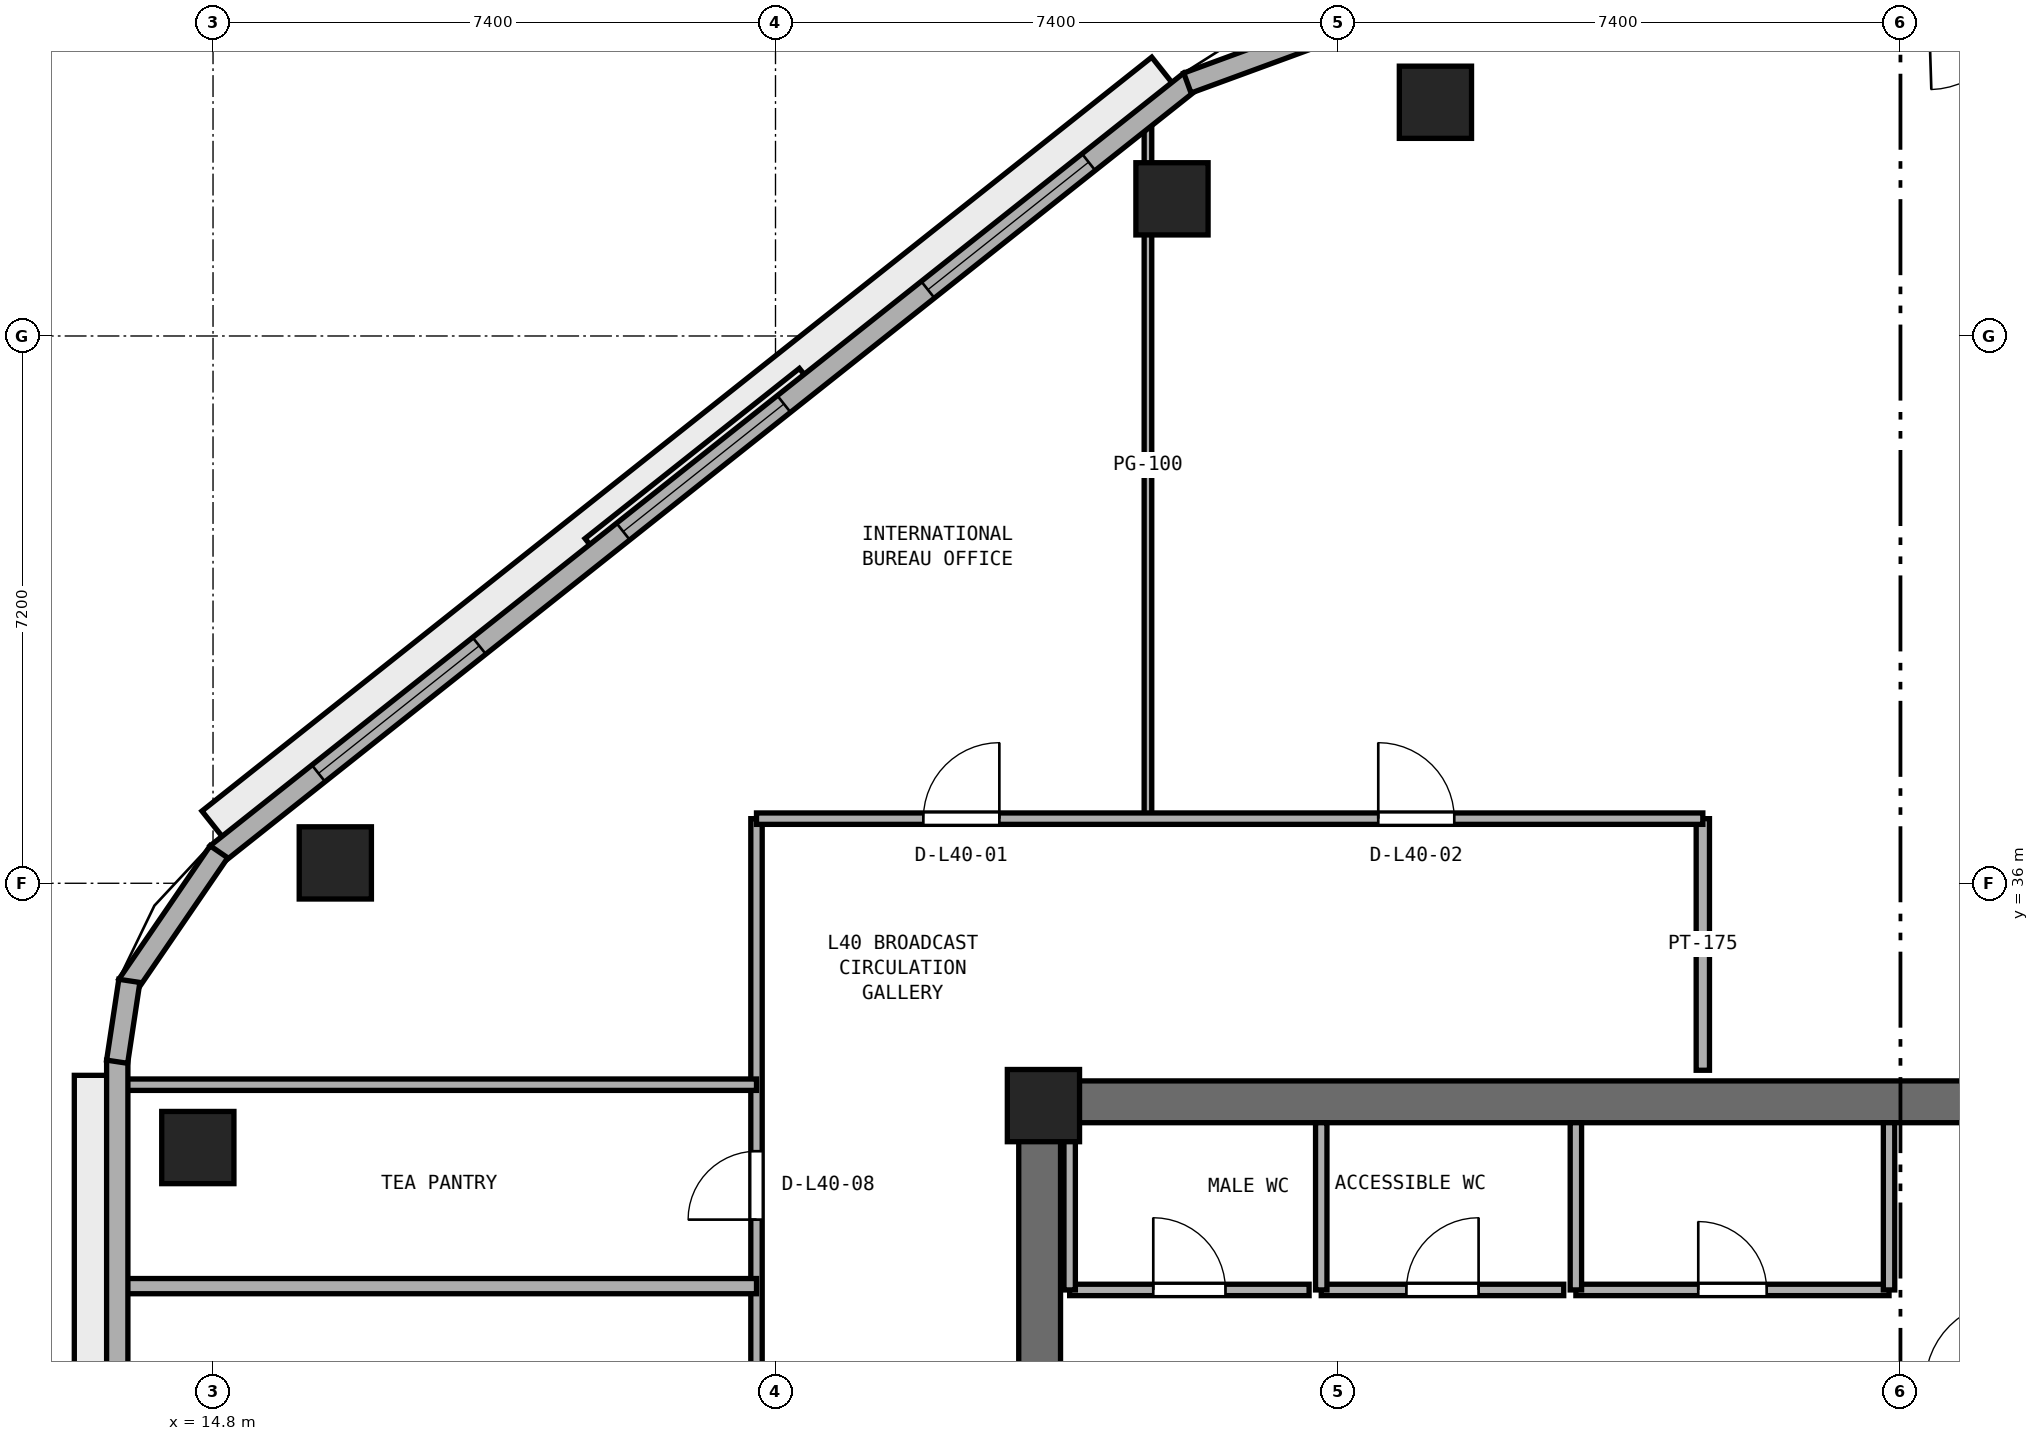
"""IFC4 building model, lengths in metres.
Left out: names, types, materials, properties, quantities, classifications, styles, units other than length and angle.
Written with IfcOpenShell. Run it as: python <this file> out.ifc"""

import sys

from ifc_helpers import new_model, si_unit, direction, frame, frame_2d, origin, origin_2d, place, context, subcontext, project, spatial, rectangle, extrude, element, fill, save


model = new_model("IFC4")
c1 = context("Model", 3, precision=1e-05, world=origin(), true_north=direction((0.0, 1.0)))
c2 = subcontext(c1, "Body", "Model", "MODEL_VIEW")
j1 = project(units=[si_unit("LENGTHUNIT", "METRE"), si_unit("PLANEANGLEUNIT", "RADIAN")], contexts=[c1])
p1 = place(None, origin())
s1 = spatial("IfcSite", under=j1, at=p1, CompositionType="ELEMENT")
p2 = place(p1, origin())
s2 = spatial("IfcBuilding", under=s1, at=p2, CompositionType="ELEMENT")
p3 = place(p2, frame((0.0, 0.0, 159.2)))
s3 = spatial("IfcBuildingStorey", under=s2, at=p3, CompositionType="ELEMENT", Elevation=159.2)
p4 = place(p3, frame((25.4, 33.125, 0.0), z_axis=(0.0, 0.0, 1.0), x_axis=(1.0, 0.0, 0.0)))
e1 = element("IfcWall", 1, at=p4, inside=s3, PredefinedType="SHEAR", context=c2, shape_type="SweptSolid", body=[
    extrude(rectangle(XDim=23.2, YDim=0.55, at=frame_2d((11.6, 0.0))), origin(), (0.0, 0.0, 1.0), 3.54),
])
p5 = place(p3, frame((25.675, 17.55, 0.0), z_axis=(0.0, 0.0, 1.0), x_axis=(0.0, 1.0, 0.0)))
e2 = element("IfcWall", 2, at=p5, inside=s3, PredefinedType="SHEAR", context=c2, shape_type="SweptSolid", body=[
    extrude(rectangle(XDim=15.3, YDim=0.55, at=frame_2d((7.65, 0.0))), origin(), (0.0, 0.0, 1.0), 3.54),
])
p6 = place(p5, frame((6.9, 0.0, 0.0)))
e3 = element("IfcOpeningElement", 3, at=p6, cuts=e2, PredefinedType="OPENING", context=c2, shape_type="SweptSolid", body=[
    extrude(rectangle(XDim=1.5, YDim=2.15, at=frame_2d((0.75, 1.075))), frame((0.0, 0.285, 0.0), z_axis=(0.0, -1.0, 0.0), x_axis=(1.0, 0.0, 0.0)), (0.0, 0.0, 1.0), 0.57),
])
p7 = place(p3, frame((25.725, 33.075, 0.0), z_axis=(0.0, 0.0, 1.0), x_axis=(1.0, 0.0, 0.0)))
e4 = element("IfcColumn", 4, at=p7, inside=s3, PredefinedType="PILASTER", context=c2, shape_type="SweptSolid", body=[
    extrude(rectangle(XDim=0.95, YDim=0.95, at=origin_2d()), origin(), (0.0, 0.0, 1.0), 3.8),
])
for number, where, z_axis, x_axis in (
    (5, (30.882, 46.275, 0.0), (0.0, 0.0, 1.0), (1.0, 0.0, 0.0)),
    (6, (27.416, 45.004, 0.0), (0.0, 0.0, 1.0), (1.0, 0.0, 0.0)),
    (7, (16.409, 36.268, 0.0), (0.0, 0.0, 1.0), (1.0, 0.0, 0.0)),
    (8, (14.6, 32.523, 0.0), (0.0, 0.0, 1.0), (1.0, 0.0, 0.0)),
):
    element("IfcColumn", number, at=place(p3, frame(where, z_axis=z_axis, x_axis=x_axis)), inside=s3, PredefinedType="COLUMN", context=c2, shape_type="SweptSolid", body=[
        extrude(rectangle(XDim=0.95, YDim=0.95, at=origin_2d()), origin(), (0.0, 0.0, 1.0), 3.8),
    ])
p8 = place(p3, frame((26.07, 30.65, 0.0), z_axis=(0.0, 0.0, 1.0), x_axis=(1.0, 0.0, 0.0)))
e9 = element("IfcWall", 9, at=p8, inside=s3, PredefinedType="PARTITIONING", context=c2, shape_type="SweptSolid", body=[
    extrude(rectangle(XDim=3.15, YDim=0.15, at=frame_2d((1.575, 0.0))), origin(), (0.0, 0.0, 1.0), 3.54),
])
p9 = place(p8, frame((1.1, 0.0, 0.0)))
e10 = element("IfcOpeningElement", 10, at=p9, cuts=e9, PredefinedType="OPENING", context=c2, shape_type="SweptSolid", body=[
    extrude(rectangle(XDim=0.95, YDim=2.1, at=frame_2d((0.475, 1.05))), frame((0.0, 0.085, 0.0), z_axis=(0.0, -1.0, 0.0), x_axis=(1.0, 0.0, 0.0)), (0.0, 0.0, 1.0), 0.17),
])
p10 = place(p3, frame((26.07, 30.65, 0.0), z_axis=(0.0, 0.0, 1.0), x_axis=(0.0, 1.0, 0.0)))
e11 = element("IfcWall", 11, at=p10, inside=s3, PredefinedType="PARTITIONING", context=c2, shape_type="SweptSolid", body=[
    extrude(rectangle(XDim=2.2, YDim=0.15, at=frame_2d((1.1, 0.0))), origin(), (0.0, 0.0, 1.0), 2.64),
])
p11 = place(p3, frame((29.38, 30.65, 0.0), z_axis=(0.0, 0.0, 1.0), x_axis=(1.0, 0.0, 0.0)))
e12 = element("IfcWall", 12, at=p11, inside=s3, PredefinedType="PARTITIONING", context=c2, shape_type="SweptSolid", body=[
    extrude(rectangle(XDim=3.19, YDim=0.15, at=frame_2d((1.595, 0.0))), origin(), (0.0, 0.0, 1.0), 3.54),
])
p12 = place(p11, frame((1.12, 0.0, 0.0)))
e13 = element("IfcOpeningElement", 13, at=p12, cuts=e12, PredefinedType="OPENING", context=c2, shape_type="SweptSolid", body=[
    extrude(rectangle(XDim=0.95, YDim=2.1, at=frame_2d((0.475, 1.05))), frame((0.0, 0.085, 0.0), z_axis=(0.0, -1.0, 0.0), x_axis=(1.0, 0.0, 0.0)), (0.0, 0.0, 1.0), 0.17),
])
p13 = place(p3, frame((29.38, 30.65, 0.0), z_axis=(0.0, 0.0, 1.0), x_axis=(0.0, 1.0, 0.0)))
e14 = element("IfcWall", 14, at=p13, inside=s3, PredefinedType="PARTITIONING", context=c2, shape_type="SweptSolid", body=[
    extrude(rectangle(XDim=2.2, YDim=0.15, at=frame_2d((1.1, 0.0))), origin(), (0.0, 0.0, 1.0), 3.54),
])
p14 = place(p3, frame((32.73, 30.65, 0.0), z_axis=(0.0, 0.0, 1.0), x_axis=(1.0, 0.0, 0.0)))
e15 = element("IfcWall", 15, at=p14, inside=s3, PredefinedType="PARTITIONING", context=c2, shape_type="SweptSolid", body=[
    extrude(rectangle(XDim=4.12, YDim=0.15, at=frame_2d((2.06, 0.0))), origin(), (0.0, 0.0, 1.0), 3.54),
])
p15 = place(p14, frame((1.61, 0.0, 0.0)))
e16 = element("IfcOpeningElement", 16, at=p15, cuts=e15, PredefinedType="OPENING", context=c2, shape_type="SweptSolid", body=[
    extrude(rectangle(XDim=0.9, YDim=2.1, at=frame_2d((0.45, 1.05))), frame((0.0, 0.085, 0.0), z_axis=(0.0, -1.0, 0.0), x_axis=(1.0, 0.0, 0.0)), (0.0, 0.0, 1.0), 0.17),
])
for number, where, z_axis, x_axis in (
    (17, (32.73, 30.65, 0.0), (0.0, 0.0, 1.0), (0.0, 1.0, 0.0)),
    (18, (36.85, 30.65, 0.0), (0.0, 0.0, 1.0), (0.0, 1.0, 0.0)),
):
    element("IfcWall", number, at=place(p3, frame(where, z_axis=z_axis, x_axis=x_axis)), inside=s3, PredefinedType="PARTITIONING", context=c2, shape_type="SweptSolid", body=[
        extrude(rectangle(XDim=2.2, YDim=0.15, at=frame_2d((1.1, 0.0))), origin(), (0.0, 0.0, 1.0), 3.54),
    ])
p16 = place(p3, frame((34.4, 33.54, 0.0), z_axis=(0.0, 0.0, 1.0), x_axis=(0.0, 1.0, 0.0)))
e19 = element("IfcWall", 19, at=p16, inside=s3, PredefinedType="PARTITIONING", context=c2, shape_type="SweptSolid", body=[
    extrude(rectangle(XDim=3.31, YDim=0.175, at=frame_2d((1.655, 0.0))), origin(), (0.0, 0.0, 1.0), 3.54),
])
p17 = place(p3, frame((27.1, 36.85, 0.0), z_axis=(0.0, 0.0, 1.0), x_axis=(0.0, 1.0, 0.0)))
e20 = element("IfcWall", 20, at=p17, inside=s3, PredefinedType="PARTITIONING", context=c2, shape_type="SweptSolid", body=[
    extrude(rectangle(XDim=9.295, YDim=0.1, at=frame_2d((4.648, 0.0))), origin(), (0.0, 0.0, 1.0), 3.54),
])
p18 = place(p3, frame((21.95, 26.55, 0.0), z_axis=(0.0, 0.0, 1.0), x_axis=(0.0, 1.0, 0.0)))
e21 = element("IfcWall", 21, at=p18, inside=s3, PredefinedType="PARTITIONING", context=c2, shape_type="SweptSolid", body=[
    extrude(rectangle(XDim=10.3, YDim=0.15, at=frame_2d((5.15, 0.0))), origin(), (0.0, 0.0, 1.0), 3.54),
])
p19 = place(p18, frame((5.025, 0.0, 0.0)))
e22 = element("IfcOpeningElement", 22, at=p19, cuts=e21, PredefinedType="OPENING", context=c2, shape_type="SweptSolid", body=[
    extrude(rectangle(XDim=0.9, YDim=2.1, at=frame_2d((0.45, 1.05))), frame((0.0, 0.085, 0.0), z_axis=(0.0, -1.0, 0.0), x_axis=(1.0, 0.0, 0.0)), (0.0, 0.0, 1.0), 0.17),
])
p20 = place(p3, frame((13.605, 30.7, 0.0), z_axis=(0.0, 0.0, 1.0), x_axis=(1.0, 0.0, 0.0)))
e23 = element("IfcWall", 23, at=p20, inside=s3, PredefinedType="PARTITIONING", context=c2, shape_type="SweptSolid", body=[
    extrude(rectangle(XDim=8.345, YDim=0.2, at=frame_2d((4.172, 0.0))), origin(), (0.0, 0.0, 1.0), 3.54),
])
p21 = place(p3, frame((13.605, 33.35, 0.0), z_axis=(0.0, 0.0, 1.0), x_axis=(1.0, 0.0, 0.0)))
e24 = element("IfcWall", 24, at=p21, inside=s3, PredefinedType="PARTITIONING", context=c2, shape_type="SweptSolid", body=[
    extrude(rectangle(XDim=8.345, YDim=0.15, at=frame_2d((4.172, 0.0))), origin(), (0.0, 0.0, 1.0), 3.54),
])
p22 = place(p3, frame((21.95, 36.85, 0.0), z_axis=(0.0, 0.0, 1.0), x_axis=(1.0, 0.0, 0.0)))
e25 = element("IfcWall", 25, at=p22, inside=s3, PredefinedType="PARTITIONING", context=c2, shape_type="SweptSolid", body=[
    extrude(rectangle(XDim=12.45, YDim=0.15, at=frame_2d((6.225, 0.0))), origin(), (0.0, 0.0, 1.0), 3.54),
])
p23 = place(p22, frame((2.195, 0.0, 0.0)))
e26 = element("IfcOpeningElement", 26, at=p23, cuts=e25, PredefinedType="OPENING", context=c2, shape_type="SweptSolid", body=[
    extrude(rectangle(XDim=1.0, YDim=2.12, at=frame_2d((0.5, 1.06))), frame((0.0, 0.085, 0.0), z_axis=(0.0, -1.0, 0.0), x_axis=(1.0, 0.0, 0.0)), (0.0, 0.0, 1.0), 0.17),
])
p24 = place(p22, frame((8.18, 0.0, 0.0)))
e27 = element("IfcOpeningElement", 27, at=p24, cuts=e25, PredefinedType="OPENING", context=c2, shape_type="SweptSolid", body=[
    extrude(rectangle(XDim=1.0, YDim=2.12, at=frame_2d((0.5, 1.06))), frame((0.0, 0.085, 0.0), z_axis=(0.0, -1.0, 0.0), x_axis=(1.0, 0.0, 0.0)), (0.0, 0.0, 1.0), 0.17),
])
p25 = place(p3, frame((27.658, 46.55, 0.0), z_axis=(0.0, 0.0, 1.0), x_axis=(-0.783266285861, -0.621686356158, 0.0)))
e28 = element("IfcWall", 28, at=p25, inside=s3, PredefinedType="STANDARD", context=c2, shape_type="SweptSolid", body=[
    extrude(rectangle(XDim=16.353, YDim=0.28, at=frame_2d((8.177, 0.0))), origin(), (0.0, 0.0, 1.0), 3.54),
])
p26 = place(p25, frame((1.709, 0.0, 0.9)))
e29 = element("IfcOpeningElement", 29, at=p26, cuts=e28, PredefinedType="OPENING", context=c2, shape_type="SweptSolid", body=[
    extrude(rectangle(XDim=2.7, YDim=1.75, at=frame_2d((1.35, 0.875))), frame((0.0, 0.15, 0.0), z_axis=(0.0, -1.0, 0.0), x_axis=(1.0, 0.0, 0.0)), (0.0, 0.0, 1.0), 0.3),
])
p27 = place(p25, frame((6.826, 0.0, 0.9)))
e30 = element("IfcOpeningElement", 30, at=p27, cuts=e28, PredefinedType="OPENING", context=c2, shape_type="SweptSolid", body=[
    extrude(rectangle(XDim=2.7, YDim=1.75, at=frame_2d((1.35, 0.875))), frame((0.0, 0.15, 0.0), z_axis=(0.0, -1.0, 0.0), x_axis=(1.0, 0.0, 0.0)), (0.0, 0.0, 1.0), 0.3),
])
p28 = place(p25, frame((11.944, 0.0, 0.9)))
e31 = element("IfcOpeningElement", 31, at=p28, cuts=e28, PredefinedType="OPENING", context=c2, shape_type="SweptSolid", body=[
    extrude(rectangle(XDim=2.7, YDim=1.75, at=frame_2d((1.35, 0.875))), frame((0.0, 0.15, 0.0), z_axis=(0.0, -1.0, 0.0), x_axis=(1.0, 0.0, 0.0)), (0.0, 0.0, 1.0), 0.3),
])
p29 = place(p3, frame((13.54, 33.673, 0.0), z_axis=(0.0, 0.0, 1.0), x_axis=(0.0, -1.0, 0.0)))
e32 = element("IfcWall", 32, at=p29, inside=s3, PredefinedType="STANDARD", context=c2, shape_type="SweptSolid", body=[
    extrude(rectangle(XDim=17.751, YDim=0.28, at=frame_2d((8.875, 0.0))), origin(), (0.0, 0.0, 1.0), 3.54),
])
p30 = place(p29, frame((13.109, 0.0, 0.9)))
e33 = element("IfcOpeningElement", 33, at=p30, cuts=e32, PredefinedType="OPENING", context=c2, shape_type="SweptSolid", body=[
    extrude(rectangle(XDim=2.7, YDim=1.75, at=frame_2d((1.35, 0.875))), frame((0.0, 0.15, 0.0), z_axis=(0.0, -1.0, 0.0), x_axis=(1.0, 0.0, 0.0)), (0.0, 0.0, 1.0), 0.3),
])
p31 = place(p3, frame((29.743, 47.306, 0.0), z_axis=(0.0, 0.0, 1.0), x_axis=(-0.93893328381, -0.344099242302, 0.0)))
e34 = element("IfcWall", 34, at=p31, inside=s3, PredefinedType="STANDARD", context=c2, shape_type="SweptSolid", body=[
    extrude(rectangle(XDim=2.262, YDim=0.28, at=frame_2d((1.131, 0.0))), origin(), (0.0, 0.0, 1.0), 3.54),
])
p32 = place(p3, frame((14.878, 36.414, 0.0), z_axis=(0.0, 0.0, 1.0), x_axis=(-0.564564614133, -0.825388875906, 0.0)))
e35 = element("IfcWall", 35, at=p32, inside=s3, PredefinedType="STANDARD", context=c2, shape_type="SweptSolid", body=[
    extrude(rectangle(XDim=2.128, YDim=0.28, at=frame_2d((1.064, 0.0))), origin(), (0.0, 0.0, 1.0), 3.54),
])
p33 = place(p3, frame((13.699, 34.716, 0.0), z_axis=(0.0, 0.0, 1.0), x_axis=(-0.149549920187, -0.988754176412, 0.0)))
e36 = element("IfcWall", 36, at=p33, inside=s3, PredefinedType="STANDARD", context=c2, shape_type="SweptSolid", body=[
    extrude(rectangle(XDim=1.076, YDim=0.28, at=frame_2d((0.538, 0.0))), origin(), (0.0, 0.0, 1.0), 3.54),
])
p34 = place(p9, origin())
e37 = element("IfcDoor", 37, at=p34, inside=s3, OperationType="SINGLE_SWING_LEFT", PredefinedType="DOOR", context=c2, shape_type="SweptSolid", body=[
    extrude(rectangle(XDim=0.95, YDim=2.1, at=frame_2d((0.475, 1.05))), frame((0.0, 0.025, 0.0), z_axis=(0.0, -1.0, 0.0), x_axis=(1.0, 0.0, 0.0)), (0.0, 0.0, 1.0), 0.05),
])
fill(e10, e37)
p35 = place(p12, origin())
e38 = element("IfcDoor", 38, at=p35, inside=s3, OperationType="SINGLE_SWING_RIGHT", PredefinedType="DOOR", context=c2, shape_type="SweptSolid", body=[
    extrude(rectangle(XDim=0.95, YDim=2.1, at=frame_2d((0.475, 1.05))), frame((0.0, 0.025, 0.0), z_axis=(0.0, -1.0, 0.0), x_axis=(1.0, 0.0, 0.0)), (0.0, 0.0, 1.0), 0.05),
])
fill(e13, e38)
p36 = place(p15, origin())
e39 = element("IfcDoor", 39, at=p36, inside=s3, OperationType="SINGLE_SWING_LEFT", PredefinedType="DOOR", context=c2, shape_type="SweptSolid", body=[
    extrude(rectangle(XDim=0.9, YDim=2.1, at=frame_2d((0.45, 1.05))), frame((0.0, 0.025, 0.0), z_axis=(0.0, -1.0, 0.0), x_axis=(1.0, 0.0, 0.0)), (0.0, 0.0, 1.0), 0.05),
])
fill(e16, e39)
p37 = place(p23, origin())
e40 = element("IfcDoor", 40, at=p37, inside=s3, OperationType="SINGLE_SWING_RIGHT", PredefinedType="DOOR", context=c2, shape_type="SweptSolid", body=[
    extrude(rectangle(XDim=1.0, YDim=2.12, at=frame_2d((0.5, 1.06))), frame((0.0, 0.025, 0.0), z_axis=(0.0, -1.0, 0.0), x_axis=(1.0, 0.0, 0.0)), (0.0, 0.0, 1.0), 0.05),
])
fill(e26, e40)
p38 = place(p24, origin())
e41 = element("IfcDoor", 41, at=p38, inside=s3, OperationType="SINGLE_SWING_LEFT", PredefinedType="DOOR", context=c2, shape_type="SweptSolid", body=[
    extrude(rectangle(XDim=1.0, YDim=2.12, at=frame_2d((0.5, 1.06))), frame((0.0, 0.025, 0.0), z_axis=(0.0, -1.0, 0.0), x_axis=(1.0, 0.0, 0.0)), (0.0, 0.0, 1.0), 0.05),
])
fill(e27, e41)
p39 = place(p19, origin())
e42 = element("IfcDoor", 42, at=p39, inside=s3, OperationType="SINGLE_SWING_LEFT", PredefinedType="DOOR", context=c2, shape_type="SweptSolid", body=[
    extrude(rectangle(XDim=0.9, YDim=2.1, at=frame_2d((0.45, 1.05))), frame((0.0, 0.025, 0.0), z_axis=(0.0, -1.0, 0.0), x_axis=(1.0, 0.0, 0.0)), (0.0, 0.0, 1.0), 0.05),
])
fill(e22, e42)
p40 = place(p26, origin())
e43 = element("IfcWindow", 43, at=p40, inside=s3, PartitioningType="SINGLE_PANEL", PredefinedType="WINDOW", context=c2, shape_type="SweptSolid", body=[
    extrude(rectangle(XDim=2.7, YDim=1.75, at=frame_2d((1.35, 0.875))), frame((0.0, 0.03, 0.0), z_axis=(0.0, -1.0, 0.0), x_axis=(1.0, 0.0, 0.0)), (0.0, 0.0, 1.0), 0.06),
])
fill(e29, e43)
p41 = place(p27, origin())
e44 = element("IfcWindow", 44, at=p41, inside=s3, PartitioningType="SINGLE_PANEL", PredefinedType="WINDOW", context=c2, shape_type="SweptSolid", body=[
    extrude(rectangle(XDim=2.7, YDim=1.75, at=frame_2d((1.35, 0.875))), frame((0.0, 0.03, 0.0), z_axis=(0.0, -1.0, 0.0), x_axis=(1.0, 0.0, 0.0)), (0.0, 0.0, 1.0), 0.06),
])
fill(e30, e44)
p42 = place(p28, origin())
e45 = element("IfcWindow", 45, at=p42, inside=s3, PartitioningType="SINGLE_PANEL", PredefinedType="WINDOW", context=c2, shape_type="SweptSolid", body=[
    extrude(rectangle(XDim=2.7, YDim=1.75, at=frame_2d((1.35, 0.875))), frame((0.0, 0.03, 0.0), z_axis=(0.0, -1.0, 0.0), x_axis=(1.0, 0.0, 0.0)), (0.0, 0.0, 1.0), 0.06),
])
fill(e31, e45)
save(model, sys.argv[1])
